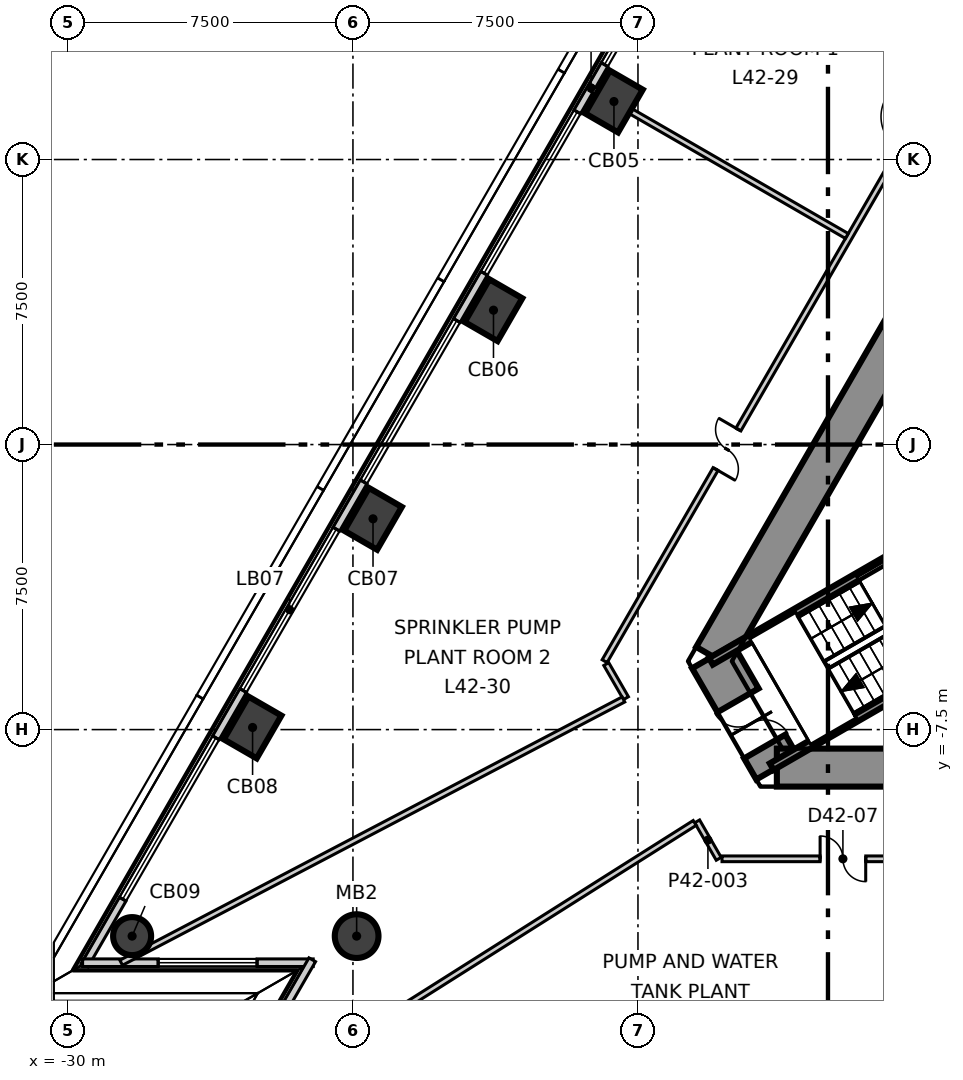
"""IFC4 building model, lengths in metres.
Left out: names, types, materials, properties, quantities, classifications, styles, units other than length and angle.
Written with IfcOpenShell. Run it as: python <this file> out.ifc"""

import sys

from ifc_helpers import new_model, si_unit, direction, frame, frame_2d, origin, origin_2d, place, context, subcontext, project, spatial, polyline, rectangle, circle, outline, extrude, element, fill, save


model = new_model("IFC4")
c1 = context("Model", 3, precision=1e-05, world=origin(), true_north=direction((0.0, 1.0)))
c2 = subcontext(c1, "Body", "Model", "MODEL_VIEW")
j1 = project(units=[si_unit("LENGTHUNIT", "METRE"), si_unit("PLANEANGLEUNIT", "RADIAN")], contexts=[c1])
p1 = place(None, origin())
s1 = spatial("IfcSite", under=j1, at=p1, CompositionType="ELEMENT")
p2 = place(p1, origin())
s2 = spatial("IfcBuilding", under=s1, at=p2, CompositionType="ELEMENT")
p3 = place(p2, frame((0.0, 0.0, 180.8)))
s3 = spatial("IfcBuildingStorey", under=s2, at=p3, CompositionType="ELEMENT", Elevation=180.8)
p4 = place(p3, frame((-1.689, 14.075, -0.6), z_axis=(0.0, 0.0, 1.0), x_axis=(-0.500003116884, -0.866023604243, 0.0)))
e1 = element("IfcWall", 1, at=p4, inside=s3, PredefinedType="SHEAR", context=c2, shape_type="SweptSolid", body=[
    extrude(outline(polyline([(-0.433, -0.5), (1.53, -0.5), (3.493, -0.5), (5.456, -0.5), (7.419, -0.5), (9.382, -0.5), (11.345, -0.5), (13.308, -0.5), (15.271, -0.5), (17.234, -0.5), (19.197, -0.5), (21.16, -0.5), (23.123, -0.5), (22.257, 0.5), (20.273, 0.5), (18.289, 0.5), (16.305, 0.5), (14.321, 0.5), (12.337, 0.5), (10.353, 0.5), (8.369, 0.5), (6.385, 0.5), (4.401, 0.5), (2.417, 0.5), (0.433, 0.5), (-0.433, -0.5)])), origin(), (0.0, 0.0, 1.0), 4.5),
])
p5 = place(p4, frame((10.939, 0.0, 0.6)))
e2 = element("IfcOpeningElement", 2, at=p5, cuts=e1, PredefinedType="OPENING", context=c2, shape_type="SweptSolid", body=[
    extrude(rectangle(XDim=1.1, YDim=2.1, at=frame_2d((0.55, 1.05))), frame((0.0, 0.51, 0.0), z_axis=(0.0, -1.0, 0.0), x_axis=(1.0, 0.0, 0.0)), (0.0, 0.0, 1.0), 1.02),
])
p6 = place(p3, frame((-13.034, -5.575, -0.6), z_axis=(0.0, 0.0, 1.0), x_axis=(0.500041548022, -0.866001414694, 0.0)))
e3 = element("IfcWall", 3, at=p6, inside=s3, PredefinedType="SHEAR", context=c2, shape_type="SweptSolid", body=[
    extrude(outline(polyline([(-0.216, -0.625), (1.689, -0.625), (3.594, -0.625), (3.161, 0.625), (1.689, 0.625), (0.217, 0.625), (-0.216, -0.625)])), origin(), (0.0, 0.0, 1.0), 4.5),
])
p7 = place(p6, frame((1.336, 0.0, 0.6)))
e4 = element("IfcOpeningElement", 4, at=p7, cuts=e3, PredefinedType="OPENING", context=c2, shape_type="SweptSolid", body=[
    extrude(rectangle(XDim=1.4, YDim=2.1, at=frame_2d((0.7, 1.05))), frame((0.0, 0.635, 0.0), z_axis=(0.0, -1.0, 0.0), x_axis=(1.0, 0.0, 0.0)), (0.0, 0.0, 1.0), 1.27),
])
p8 = place(p3, frame((-11.345, -8.5, -0.6), z_axis=(0.0, 0.0, 1.0), x_axis=(1.0, 0.0, 0.0)))
e5 = element("IfcWall", 5, at=p8, inside=s3, PredefinedType="SHEAR", context=c2, shape_type="SweptSolid", body=[
    extrude(outline(polyline([(-0.433, -0.5), (1.53, -0.5), (3.493, -0.5), (5.456, -0.5), (7.419, -0.5), (9.382, -0.5), (11.345, -0.5), (13.308, -0.5), (15.271, -0.5), (17.234, -0.5), (19.197, -0.5), (21.16, -0.5), (23.123, -0.5), (22.257, 0.5), (20.273, 0.5), (18.289, 0.5), (16.305, 0.5), (14.321, 0.5), (12.337, 0.5), (10.353, 0.5), (8.369, 0.5), (6.385, 0.5), (4.401, 0.5), (2.417, 0.5), (0.433, 0.5), (-0.433, -0.5)])), origin(), (0.0, 0.0, 1.0), 4.5),
])
p9 = place(p8, frame((4.444, 0.0, 0.6)))
e6 = element("IfcOpeningElement", 6, at=p9, cuts=e5, PredefinedType="OPENING", context=c2, shape_type="SweptSolid", body=[
    extrude(rectangle(XDim=0.9, YDim=2.1, at=frame_2d((0.45, 1.05))), frame((0.0, 0.51, 0.0), z_axis=(0.0, -1.0, 0.0), x_axis=(1.0, 0.0, 0.0)), (0.0, 0.0, 1.0), 1.02),
])
p10 = place(p8, frame((17.584, 0.0, 0.6)))
e7 = element("IfcOpeningElement", 7, at=p10, cuts=e5, PredefinedType="OPENING", context=c2, shape_type="SweptSolid", body=[
    extrude(rectangle(XDim=1.0, YDim=2.1, at=frame_2d((0.5, 1.05))), frame((0.0, 0.51, 0.0), z_axis=(0.0, -1.0, 0.0), x_axis=(1.0, 0.0, 0.0)), (0.0, 0.0, 1.0), 1.02),
])
for number, where, z_axis, x_axis in (
    (8, (-15.632, 9.026, -0.6), (0.0, 0.0, 1.0), (0.5, 0.866, 0.0)),
    (9, (-18.802, 3.536, -0.6), (0.0, 0.0, 1.0), (0.5, 0.866, 0.0)),
    (10, (-21.972, -1.954, -0.6), (0.0, 0.0, 1.0), (0.5, 0.866, 0.0)),
    (11, (-25.141, -7.444, -0.6), (0.0, 0.0, 1.0), (0.5, 0.866, 0.0)),
):
    element("IfcColumn", number, at=place(p3, frame(where, z_axis=z_axis, x_axis=x_axis)), inside=s3, PredefinedType="COLUMN", context=c2, shape_type="SweptSolid", body=[
        extrude(rectangle(XDim=1.3, YDim=1.0, at=origin_2d()), origin(), (0.0, 0.0, 1.0), 4.5),
    ])
p11 = place(p3, frame((-28.311, -12.934, -0.6), z_axis=(0.0, 0.0, 1.0), x_axis=(0.5, 0.866025403784, 0.0)))
e12 = element("IfcColumn", 12, at=p11, inside=s3, PredefinedType="COLUMN", context=c2, shape_type="SweptSolid", body=[
    extrude(circle(Radius=0.5, at=origin_2d()), origin(), (0.0, 0.0, 1.0), 4.5),
])
p12 = place(p3, frame((-22.403, -12.934, -0.6), z_axis=(0.0, 0.0, 1.0), x_axis=(1.0, 0.0, 0.0)))
e13 = element("IfcColumn", 13, at=p12, inside=s3, PredefinedType="COLUMN", context=c2, shape_type="SweptSolid", body=[
    extrude(circle(Radius=0.575, at=origin_2d()), origin(), (0.0, 0.0, 1.0), 4.5),
])
p13 = place(p3, frame((-2.909, 32.463, 0.0), z_axis=(0.0, 0.0, 1.0), x_axis=(-0.500011769953, -0.866018608292, 0.0)))
e14 = element("IfcWall", 14, at=p13, inside=s3, PredefinedType="ELEMENTEDWALL", context=c2, shape_type="SweptSolid", body=[
    extrude(rectangle(XDim=53.299, YDim=0.2, at=frame_2d((26.649, 0.0))), origin(), (0.0, 0.0, 1.0), 3.9),
])
p14 = place(p13, frame((2.022, 0.0, 0.6)))
e15 = element("IfcOpeningElement", 15, at=p14, cuts=e14, PredefinedType="OPENING", context=c2, shape_type="SweptSolid", body=[
    extrude(rectangle(XDim=4.9, YDim=3.0, at=frame_2d((2.45, 1.5))), frame((0.0, 0.11, 0.0), z_axis=(0.0, -1.0, 0.0), x_axis=(1.0, 0.0, 0.0)), (0.0, 0.0, 1.0), 0.22),
])
p15 = place(p13, frame((8.361, 0.0, 0.6)))
e16 = element("IfcOpeningElement", 16, at=p15, cuts=e14, PredefinedType="OPENING", context=c2, shape_type="SweptSolid", body=[
    extrude(rectangle(XDim=4.9, YDim=3.0, at=frame_2d((2.45, 1.5))), frame((0.0, 0.11, 0.0), z_axis=(0.0, -1.0, 0.0), x_axis=(1.0, 0.0, 0.0)), (0.0, 0.0, 1.0), 0.22),
])
p16 = place(p13, frame((14.7, 0.0, 0.6)))
e17 = element("IfcOpeningElement", 17, at=p16, cuts=e14, PredefinedType="OPENING", context=c2, shape_type="SweptSolid", body=[
    extrude(rectangle(XDim=4.9, YDim=3.0, at=frame_2d((2.45, 1.5))), frame((0.0, 0.11, 0.0), z_axis=(0.0, -1.0, 0.0), x_axis=(1.0, 0.0, 0.0)), (0.0, 0.0, 1.0), 0.22),
])
p17 = place(p13, frame((21.04, 0.0, 0.6)))
e18 = element("IfcOpeningElement", 18, at=p17, cuts=e14, PredefinedType="OPENING", context=c2, shape_type="SweptSolid", body=[
    extrude(rectangle(XDim=4.9, YDim=3.0, at=frame_2d((2.45, 1.5))), frame((0.0, 0.11, 0.0), z_axis=(0.0, -1.0, 0.0), x_axis=(1.0, 0.0, 0.0)), (0.0, 0.0, 1.0), 0.22),
])
p18 = place(p13, frame((27.379, 0.0, 0.6)))
e19 = element("IfcOpeningElement", 19, at=p18, cuts=e14, PredefinedType="OPENING", context=c2, shape_type="SweptSolid", body=[
    extrude(rectangle(XDim=4.9, YDim=3.0, at=frame_2d((2.45, 1.5))), frame((0.0, 0.11, 0.0), z_axis=(0.0, -1.0, 0.0), x_axis=(1.0, 0.0, 0.0)), (0.0, 0.0, 1.0), 0.22),
])
p19 = place(p13, frame((33.718, 0.0, 0.6)))
e20 = element("IfcOpeningElement", 20, at=p19, cuts=e14, PredefinedType="OPENING", context=c2, shape_type="SweptSolid", body=[
    extrude(rectangle(XDim=4.9, YDim=3.0, at=frame_2d((2.45, 1.5))), frame((0.0, 0.11, 0.0), z_axis=(0.0, -1.0, 0.0), x_axis=(1.0, 0.0, 0.0)), (0.0, 0.0, 1.0), 0.22),
])
p20 = place(p13, frame((40.057, 0.0, 0.6)))
e21 = element("IfcOpeningElement", 21, at=p20, cuts=e14, PredefinedType="OPENING", context=c2, shape_type="SweptSolid", body=[
    extrude(rectangle(XDim=4.9, YDim=3.0, at=frame_2d((2.45, 1.5))), frame((0.0, 0.11, 0.0), z_axis=(0.0, -1.0, 0.0), x_axis=(1.0, 0.0, 0.0)), (0.0, 0.0, 1.0), 0.22),
])
p21 = place(p13, frame((46.396, 0.0, 0.6)))
e22 = element("IfcOpeningElement", 22, at=p21, cuts=e14, PredefinedType="OPENING", context=c2, shape_type="SweptSolid", body=[
    extrude(rectangle(XDim=4.9, YDim=3.0, at=frame_2d((2.45, 1.5))), frame((0.0, 0.11, 0.0), z_axis=(0.0, -1.0, 0.0), x_axis=(1.0, 0.0, 0.0)), (0.0, 0.0, 1.0), 0.22),
])
p22 = place(p3, frame((-29.614, -13.634, 0.0), z_axis=(0.0, 0.0, 1.0), x_axis=(1.0, 0.0, 0.0)))
e23 = element("IfcWall", 23, at=p22, inside=s3, PredefinedType="ELEMENTEDWALL", context=c2, shape_type="SweptSolid", body=[
    extrude(rectangle(XDim=6.068, YDim=0.2, at=frame_2d((3.034, 0.0))), origin(), (0.0, 0.0, 1.0), 3.9),
])
p23 = place(p22, frame((1.99, 0.0, 0.6)))
e24 = element("IfcOpeningElement", 24, at=p23, cuts=e23, PredefinedType="OPENING", context=c2, shape_type="SweptSolid", body=[
    extrude(rectangle(XDim=2.6, YDim=3.0, at=frame_2d((1.3, 1.5))), frame((0.0, 0.11, 0.0), z_axis=(0.0, -1.0, 0.0), x_axis=(1.0, 0.0, 0.0)), (0.0, 0.0, 1.0), 0.22),
])
p24 = place(p3, frame((-23.571, -13.556, 0.0), z_axis=(0.0, 0.0, 1.0), x_axis=(-0.499916304465, -0.866073720032, 0.0)))
e25 = element("IfcWall", 25, at=p24, inside=s3, PredefinedType="ELEMENTEDWALL", context=c2, shape_type="SweptSolid", body=[
    extrude(rectangle(XDim=6.069, YDim=0.2, at=frame_2d((3.034, 0.0))), origin(), (0.0, 0.0, 1.0), 3.9),
])
p25 = place(p24, frame((1.39, 0.0, 0.6)))
e26 = element("IfcOpeningElement", 26, at=p25, cuts=e25, PredefinedType="OPENING", context=c2, shape_type="SweptSolid", body=[
    extrude(rectangle(XDim=2.6, YDim=3.0, at=frame_2d((1.3, 1.5))), frame((0.0, 0.11, 0.0), z_axis=(0.0, -1.0, 0.0), x_axis=(1.0, 0.0, 0.0)), (0.0, 0.0, 1.0), 0.22),
])
p26 = place(p3, frame((-15.877, -5.7, 0.0), z_axis=(0.0, 0.0, 1.0), x_axis=(0.500001771058, 0.866024381261, 0.0)))
e27 = element("IfcWall", 27, at=p26, inside=s3, PredefinedType="PARTITIONING", context=c2, shape_type="SweptSolid", body=[
    extrude(rectangle(XDim=25.75, YDim=0.15, at=frame_2d((12.875, 0.0))), origin(), (0.0, 0.0, 1.0), 3.9),
])
p27 = place(p26, frame((21.882, 0.0, 0.0)))
e28 = element("IfcOpeningElement", 28, at=p27, cuts=e27, PredefinedType="OPENING", context=c2, shape_type="SweptSolid", body=[
    extrude(rectangle(XDim=1.2, YDim=2.1, at=frame_2d((0.6, 1.05))), frame((0.0, 0.085, 0.0), z_axis=(0.0, -1.0, 0.0), x_axis=(1.0, 0.0, 0.0)), (0.0, 0.0, 1.0), 0.17),
])
p28 = place(p26, frame((15.545, 0.0, 0.0)))
e29 = element("IfcOpeningElement", 29, at=p28, cuts=e27, PredefinedType="OPENING", context=c2, shape_type="SweptSolid", body=[
    extrude(rectangle(XDim=1.0, YDim=2.1, at=frame_2d((0.5, 1.05))), frame((0.0, 0.085, 0.0), z_axis=(0.0, -1.0, 0.0), x_axis=(1.0, 0.0, 0.0)), (0.0, 0.0, 1.0), 0.17),
])
p29 = place(p26, frame((5.838, 0.0, 0.0)))
e30 = element("IfcOpeningElement", 30, at=p29, cuts=e27, PredefinedType="OPENING", context=c2, shape_type="SweptSolid", body=[
    extrude(rectangle(XDim=1.2, YDim=2.1, at=frame_2d((0.6, 1.05))), frame((0.0, 0.085, 0.0), z_axis=(0.0, -1.0, 0.0), x_axis=(1.0, 0.0, 0.0)), (0.0, 0.0, 1.0), 0.17),
])
p30 = place(p3, frame((-15.834, -5.775, 0.0), z_axis=(0.0, 0.0, 1.0), x_axis=(0.499634122846, -0.866236540033, 0.0)))
e31 = element("IfcWall", 31, at=p30, inside=s3, PredefinedType="PARTITIONING", context=c2, shape_type="SweptSolid", body=[
    extrude(rectangle(XDim=1.037, YDim=0.15, at=frame_2d((0.519, 0.0))), origin(), (0.0, 0.0, 1.0), 3.9),
])
p31 = place(p3, frame((-13.443, -9.915, 0.0), z_axis=(0.0, 0.0, 1.0), x_axis=(0.499672881641, -0.866214183301, 0.0)))
e32 = element("IfcWall", 32, at=p31, inside=s3, PredefinedType="PARTITIONING", context=c2, shape_type="SweptSolid", body=[
    extrude(rectangle(XDim=1.137, YDim=0.15, at=frame_2d((0.568, 0.0))), origin(), (0.0, 0.0, 1.0), 3.9),
])
p32 = place(p3, frame((-28.599, -13.634, 0.0), z_axis=(0.0, 0.0, 1.0), x_axis=(0.885727117854, 0.464206282485, 0.0)))
e33 = element("IfcWall", 33, at=p32, inside=s3, PredefinedType="PARTITIONING", context=c2, shape_type="SweptSolid", body=[
    extrude(rectangle(XDim=14.922, YDim=0.15, at=frame_2d((7.461, 0.0))), origin(), (0.0, 0.0, 1.0), 3.2),
])
p33 = place(p3, frame((-26.08, -17.903, 0.0), z_axis=(0.0, 0.0, 1.0), x_axis=(0.845301244448, 0.534290001904, 0.0)))
e34 = element("IfcWall", 34, at=p33, inside=s3, PredefinedType="PARTITIONING", context=c2, shape_type="SweptSolid", body=[
    extrude(rectangle(XDim=14.874, YDim=0.15, at=frame_2d((7.437, 0.0))), origin(), (0.0, 0.0, 1.0), 3.2),
])
p34 = place(p3, frame((-12.788, -10.9, 0.0), z_axis=(0.0, 0.0, 1.0), x_axis=(1.0, 0.0, 0.0)))
e35 = element("IfcWall", 35, at=p34, inside=s3, PredefinedType="PARTITIONING", context=c2, shape_type="SweptSolid", body=[
    extrude(rectangle(XDim=25.663, YDim=0.15, at=frame_2d((12.832, 0.0))), origin(), (0.0, 0.0, 1.0), 3.9),
])
p35 = place(p34, frame((2.581, 0.0, 0.0)))
e36 = element("IfcOpeningElement", 36, at=p35, cuts=e35, PredefinedType="OPENING", context=c2, shape_type="SweptSolid", body=[
    extrude(rectangle(XDim=1.2, YDim=2.1, at=frame_2d((0.6, 1.05))), frame((0.0, 0.085, 0.0), z_axis=(0.0, -1.0, 0.0), x_axis=(1.0, 0.0, 0.0)), (0.0, 0.0, 1.0), 0.17),
])
p36 = place(p34, frame((9.118, 0.0, 0.0)))
e37 = element("IfcOpeningElement", 37, at=p36, cuts=e35, PredefinedType="OPENING", context=c2, shape_type="SweptSolid", body=[
    extrude(rectangle(XDim=1.0, YDim=2.1, at=frame_2d((0.5, 1.05))), frame((0.0, 0.085, 0.0), z_axis=(0.0, -1.0, 0.0), x_axis=(1.0, 0.0, 0.0)), (0.0, 0.0, 1.0), 0.17),
])
p37 = place(p34, frame((15.457, 0.0, 0.0)))
e38 = element("IfcOpeningElement", 38, at=p37, cuts=e35, PredefinedType="OPENING", context=c2, shape_type="SweptSolid", body=[
    extrude(rectangle(XDim=1.0, YDim=2.1, at=frame_2d((0.5, 1.05))), frame((0.0, 0.085, 0.0), z_axis=(0.0, -1.0, 0.0), x_axis=(1.0, 0.0, 0.0)), (0.0, 0.0, 1.0), 0.17),
])
p38 = place(p34, frame((21.795, 0.0, 0.0)))
e39 = element("IfcOpeningElement", 39, at=p38, cuts=e35, PredefinedType="OPENING", context=c2, shape_type="SweptSolid", body=[
    extrude(rectangle(XDim=1.2, YDim=2.1, at=frame_2d((0.6, 1.05))), frame((0.0, 0.085, 0.0), z_axis=(0.0, -1.0, 0.0), x_axis=(1.0, 0.0, 0.0)), (0.0, 0.0, 1.0), 0.17),
])
p39 = place(p3, frame((-16.238, 9.376, 0.0), z_axis=(0.0, 0.0, 1.0), x_axis=(0.8660261172, -0.499998764326, 0.0)))
e40 = element("IfcWall", 40, at=p39, inside=s3, PredefinedType="PARTITIONING", context=c2, shape_type="SweptSolid", body=[
    extrude(rectangle(XDim=7.776, YDim=0.15, at=frame_2d((3.888, 0.0))), origin(), (0.0, 0.0, 1.0), 3.4),
])
p40 = place(p3, frame((-13.08, -5.704, 0.0), z_axis=(0.0, 0.0, 1.0), x_axis=(0.866039934834, 0.499974830638, 0.0)))
e41 = element("IfcWall", 41, at=p40, inside=s3, PredefinedType="SOLIDWALL", context=c2, shape_type="SweptSolid", body=[
    extrude(rectangle(XDim=7.564, YDim=0.2, at=frame_2d((3.782, 0.0))), origin(), (0.0, 0.0, 1.0), 3.9),
])
p41 = place(p3, frame((-11.48, -8.476, 0.0), z_axis=(0.0, 0.0, 1.0), x_axis=(0.865984032653, 0.500071650056, 0.0)))
e42 = element("IfcWall", 42, at=p41, inside=s3, PredefinedType="SOLIDWALL", context=c2, shape_type="SweptSolid", body=[
    extrude(rectangle(XDim=7.565, YDim=0.2, at=frame_2d((3.782, 0.0))), origin(), (0.0, 0.0, 1.0), 3.9),
])
p42 = place(p17, origin())
e43 = element("IfcWindow", 43, at=p42, inside=s3, PartitioningType="SINGLE_PANEL", PredefinedType="WINDOW", context=c2, shape_type="SweptSolid", body=[
    extrude(rectangle(XDim=4.9, YDim=3.0, at=frame_2d((2.45, 1.5))), frame((0.0, 0.03, 0.0), z_axis=(0.0, -1.0, 0.0), x_axis=(1.0, 0.0, 0.0)), (0.0, 0.0, 1.0), 0.06),
])
fill(e18, e43)
p43 = place(p18, origin())
e44 = element("IfcWindow", 44, at=p43, inside=s3, PartitioningType="SINGLE_PANEL", PredefinedType="WINDOW", context=c2, shape_type="SweptSolid", body=[
    extrude(rectangle(XDim=4.9, YDim=3.0, at=frame_2d((2.45, 1.5))), frame((0.0, 0.03, 0.0), z_axis=(0.0, -1.0, 0.0), x_axis=(1.0, 0.0, 0.0)), (0.0, 0.0, 1.0), 0.06),
])
fill(e19, e44)
p44 = place(p19, origin())
e45 = element("IfcWindow", 45, at=p44, inside=s3, PartitioningType="SINGLE_PANEL", PredefinedType="WINDOW", context=c2, shape_type="SweptSolid", body=[
    extrude(rectangle(XDim=4.9, YDim=3.0, at=frame_2d((2.45, 1.5))), frame((0.0, 0.03, 0.0), z_axis=(0.0, -1.0, 0.0), x_axis=(1.0, 0.0, 0.0)), (0.0, 0.0, 1.0), 0.06),
])
fill(e20, e45)
p45 = place(p20, origin())
e46 = element("IfcWindow", 46, at=p45, inside=s3, PartitioningType="SINGLE_PANEL", PredefinedType="WINDOW", context=c2, shape_type="SweptSolid", body=[
    extrude(rectangle(XDim=4.9, YDim=3.0, at=frame_2d((2.45, 1.5))), frame((0.0, 0.03, 0.0), z_axis=(0.0, -1.0, 0.0), x_axis=(1.0, 0.0, 0.0)), (0.0, 0.0, 1.0), 0.06),
])
fill(e21, e46)
p46 = place(p21, origin())
e47 = element("IfcWindow", 47, at=p46, inside=s3, PartitioningType="SINGLE_PANEL", PredefinedType="WINDOW", context=c2, shape_type="SweptSolid", body=[
    extrude(rectangle(XDim=4.9, YDim=3.0, at=frame_2d((2.45, 1.5))), frame((0.0, 0.03, 0.0), z_axis=(0.0, -1.0, 0.0), x_axis=(1.0, 0.0, 0.0)), (0.0, 0.0, 1.0), 0.06),
])
fill(e22, e47)
p47 = place(p23, origin())
e48 = element("IfcWindow", 48, at=p47, inside=s3, PartitioningType="SINGLE_PANEL", PredefinedType="WINDOW", context=c2, shape_type="SweptSolid", body=[
    extrude(rectangle(XDim=2.6, YDim=3.0, at=frame_2d((1.3, 1.5))), frame((0.0, 0.03, 0.0), z_axis=(0.0, -1.0, 0.0), x_axis=(1.0, 0.0, 0.0)), (0.0, 0.0, 1.0), 0.06),
])
fill(e24, e48)
p48 = place(p35, origin())
e49 = element("IfcDoor", 49, at=p48, inside=s3, OperationType="DOUBLE_DOOR_SINGLE_SWING", PredefinedType="DOOR", context=c2, shape_type="SweptSolid", body=[
    extrude(rectangle(XDim=1.2, YDim=2.1, at=frame_2d((0.6, 1.05))), frame((0.0, 0.025, 0.0), z_axis=(0.0, -1.0, 0.0), x_axis=(1.0, 0.0, 0.0)), (0.0, 0.0, 1.0), 0.05),
])
fill(e36, e49)
p49 = place(p29, origin())
e50 = element("IfcDoor", 50, at=p49, inside=s3, OperationType="DOUBLE_DOOR_SINGLE_SWING", PredefinedType="DOOR", context=c2, shape_type="SweptSolid", body=[
    extrude(rectangle(XDim=1.2, YDim=2.1, at=frame_2d((0.6, 1.05))), frame((0.0, 0.025, 0.0), z_axis=(0.0, -1.0, 0.0), x_axis=(1.0, 0.0, 0.0)), (0.0, 0.0, 1.0), 0.05),
])
fill(e30, e50)
p50 = place(p7, origin())
e51 = element("IfcDoor", 51, at=p50, inside=s3, OperationType="DOUBLE_DOOR_SINGLE_SWING", PredefinedType="DOOR", context=c2, shape_type="SweptSolid", body=[
    extrude(rectangle(XDim=1.4, YDim=2.1, at=frame_2d((0.7, 1.05))), frame((0.0, 0.025, 0.0), z_axis=(0.0, -1.0, 0.0), x_axis=(1.0, 0.0, 0.0)), (0.0, 0.0, 1.0), 0.05),
])
fill(e4, e51)
save(model, sys.argv[1])
